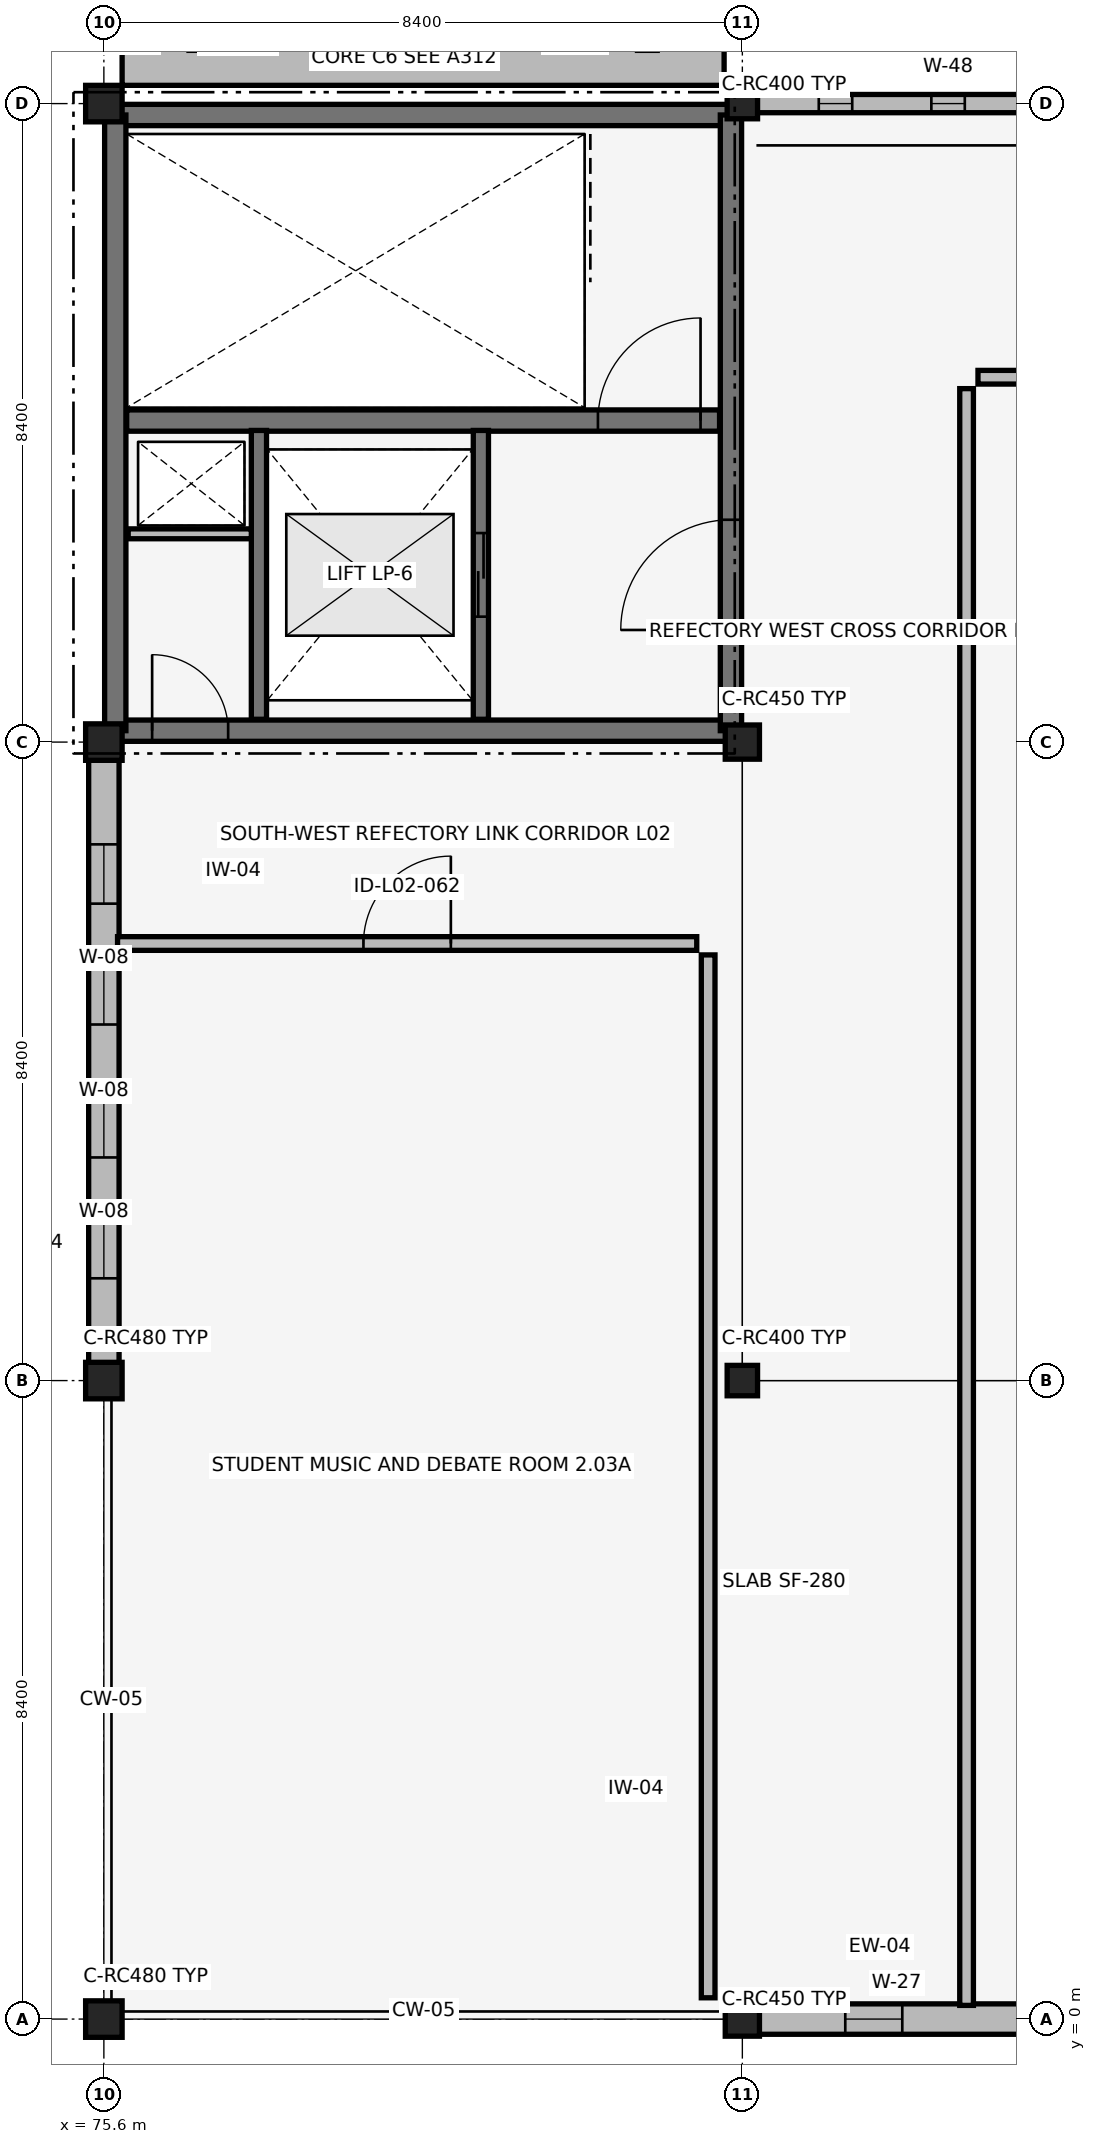
"""IFC4 building model, lengths in metres.
Left out: names, types, materials, properties, quantities, classifications, styles, units other than length and angle.
Written with IfcOpenShell. Run it as: python <this file> out.ifc"""

import sys

from ifc_helpers import new_model, si_unit, direction, frame, frame_2d, origin, origin_2d, place, context, subcontext, project, spatial, rectangle, extrude, element, fill, save


model = new_model("IFC4")
c1 = context("Model", 3, precision=1e-05, world=origin(), true_north=direction((0.0, 1.0)))
c2 = subcontext(c1, "Body", "Model", "MODEL_VIEW")
j1 = project(units=[si_unit("LENGTHUNIT", "METRE"), si_unit("PLANEANGLEUNIT", "RADIAN")], contexts=[c1])
p1 = place(None, origin())
s1 = spatial("IfcSite", under=j1, at=p1, CompositionType="ELEMENT")
p2 = place(p1, origin())
s2 = spatial("IfcBuilding", under=s1, at=p2, CompositionType="ELEMENT")
p3 = place(p2, frame((0.0, 0.0, 9.86)))
s3 = spatial("IfcBuildingStorey", under=s2, at=p3, CompositionType="ELEMENT", Elevation=9.86)
p4 = place(p3, frame((75.75, 16.95, 0.0), z_axis=(0.0, 0.0, 1.0), x_axis=(1.0, 0.0, 0.0)))
e1 = element("IfcWall", 1, at=p4, inside=s3, PredefinedType="SHEAR", context=c2, shape_type="SweptSolid", body=[
    extrude(rectangle(XDim=8.1, YDim=0.28, at=frame_2d((4.05, 0.0))), origin(), (0.0, 0.0, 1.0), 3.78),
])
p5 = place(p4, frame((0.485, 0.0, 0.0)))
e2 = element("IfcOpeningElement", 2, at=p5, cuts=e1, PredefinedType="OPENING", context=c2, shape_type="SweptSolid", body=[
    extrude(rectangle(XDim=1.0, YDim=2.15, at=frame_2d((0.5, 1.075))), frame((0.0, 0.15, 0.0), z_axis=(0.0, -1.0, 0.0), x_axis=(1.0, 0.0, 0.0)), (0.0, 0.0, 1.0), 0.3),
])
for number, where, z_axis, x_axis in (
    (3, (75.75, 25.05, 0.0), (0.0, 0.0, 1.0), (1.0, 0.0, 0.0)),
    (4, (75.75, 16.95, 0.0), (0.0, 0.0, 1.0), (0.0, 1.0, 0.0)),
):
    element("IfcWall", number, at=place(p3, frame(where, z_axis=z_axis, x_axis=x_axis)), inside=s3, PredefinedType="SHEAR", context=c2, shape_type="SweptSolid", body=[
        extrude(rectangle(XDim=8.1, YDim=0.28, at=frame_2d((4.05, 0.0))), origin(), (0.0, 0.0, 1.0), 3.78),
    ])
p6 = place(p3, frame((83.85, 16.95, 0.0), z_axis=(0.0, 0.0, 1.0), x_axis=(0.0, 1.0, 0.0)))
e5 = element("IfcWall", 5, at=p6, inside=s3, PredefinedType="SHEAR", context=c2, shape_type="SweptSolid", body=[
    extrude(rectangle(XDim=8.1, YDim=0.28, at=frame_2d((4.05, 0.0))), origin(), (0.0, 0.0, 1.0), 3.78),
])
p7 = place(p6, frame((1.325, 0.0, 0.0)))
e6 = element("IfcOpeningElement", 6, at=p7, cuts=e5, PredefinedType="OPENING", context=c2, shape_type="SweptSolid", body=[
    extrude(rectangle(XDim=1.45, YDim=2.15, at=frame_2d((0.725, 1.075))), frame((0.0, 0.15, 0.0), z_axis=(0.0, -1.0, 0.0), x_axis=(1.0, 0.0, 0.0)), (0.0, 0.0, 1.0), 0.3),
])
p8 = place(p3, frame((75.9, 21.03, 0.0), z_axis=(0.0, 0.0, 1.0), x_axis=(1.0, 0.0, 0.0)))
e7 = element("IfcWall", 7, at=p8, inside=s3, PredefinedType="SHEAR", context=c2, shape_type="SweptSolid", body=[
    extrude(rectangle(XDim=7.8, YDim=0.28, at=frame_2d((3.9, 0.0))), origin(), (0.0, 0.0, 1.0), 3.78),
])
p9 = place(p8, frame((6.2, 0.0, 0.0)))
e8 = element("IfcOpeningElement", 8, at=p9, cuts=e7, PredefinedType="OPENING", context=c2, shape_type="SweptSolid", body=[
    extrude(rectangle(XDim=1.35, YDim=2.15, at=frame_2d((0.675, 1.075))), frame((0.0, 0.15, 0.0), z_axis=(0.0, -1.0, 0.0), x_axis=(1.0, 0.0, 0.0)), (0.0, 0.0, 1.0), 0.3),
])
for number, where, z_axis, x_axis in (
    (9, (75.6, 0.0, 0.0), (0.0, 0.0, 1.0), (1.0, 0.0, 0.0)),
    (10, (75.6, 8.4, 0.0), (0.0, 0.0, 1.0), (1.0, 0.0, 0.0)),
    (11, (75.6, 16.8, 0.0), (0.0, 0.0, 1.0), (1.0, 0.0, 0.0)),
    (12, (75.6, 25.2, 0.0), (0.0, 0.0, 1.0), (1.0, 0.0, 0.0)),
):
    element("IfcColumn", number, at=place(p3, frame(where, z_axis=z_axis, x_axis=x_axis)), inside=s3, PredefinedType="COLUMN", context=c2, shape_type="SweptSolid", body=[
        extrude(rectangle(XDim=0.48, YDim=0.48, at=origin_2d()), origin(), (0.0, 0.0, 1.0), 3.78),
    ])
p10 = place(p3, frame((84.0, 0.0, 0.0), z_axis=(0.0, 0.0, 1.0), x_axis=(1.0, 0.0, 0.0)))
e13 = element("IfcColumn", 13, at=p10, inside=s3, PredefinedType="COLUMN", context=c2, shape_type="SweptSolid", body=[
    extrude(rectangle(XDim=0.45, YDim=0.45, at=origin_2d()), origin(), (0.0, 0.0, 1.0), 3.78),
])
p11 = place(p3, frame((84.0, 8.4, 0.0), z_axis=(0.0, 0.0, 1.0), x_axis=(1.0, 0.0, 0.0)))
e14 = element("IfcColumn", 14, at=p11, inside=s3, PredefinedType="COLUMN", context=c2, shape_type="SweptSolid", body=[
    extrude(rectangle(XDim=0.4, YDim=0.4, at=origin_2d()), origin(), (0.0, 0.0, 1.0), 3.78),
])
p12 = place(p3, frame((84.0, 16.8, 0.0), z_axis=(0.0, 0.0, 1.0), x_axis=(1.0, 0.0, 0.0)))
e15 = element("IfcColumn", 15, at=p12, inside=s3, PredefinedType="COLUMN", context=c2, shape_type="SweptSolid", body=[
    extrude(rectangle(XDim=0.45, YDim=0.45, at=origin_2d()), origin(), (0.0, 0.0, 1.0), 3.78),
])
p13 = place(p3, frame((84.0, 25.2, 0.0), z_axis=(0.0, 0.0, 1.0), x_axis=(1.0, 0.0, 0.0)))
e16 = element("IfcColumn", 16, at=p13, inside=s3, PredefinedType="COLUMN", context=c2, shape_type="SweptSolid", body=[
    extrude(rectangle(XDim=0.4, YDim=0.4, at=origin_2d()), origin(), (0.0, 0.0, 1.0), 3.78),
])
p14 = place(p3, frame((75.6, 8.625, 0.0), z_axis=(0.0, 0.0, 1.0), x_axis=(0.0, 1.0, 0.0)))
e17 = element("IfcWall", 17, at=p14, inside=s3, PredefinedType="SOLIDWALL", context=c2, shape_type="SweptSolid", body=[
    extrude(rectangle(XDim=7.95, YDim=0.4, at=frame_2d((3.975, 0.0))), origin(), (0.0, 0.0, 1.0), 3.21),
])
p15 = place(p14, frame((1.121, 0.0, 0.75)))
e18 = element("IfcOpeningElement", 18, at=p15, cuts=e17, PredefinedType="OPENING", context=c2, shape_type="SweptSolid", body=[
    extrude(rectangle(XDim=0.78, YDim=2.35, at=frame_2d((0.39, 1.175))), frame((0.0, 0.21, 0.0), z_axis=(0.0, -1.0, 0.0), x_axis=(1.0, 0.0, 0.0)), (0.0, 0.0, 1.0), 0.42),
])
p16 = place(p14, frame((2.71, 0.0, 0.75)))
e19 = element("IfcOpeningElement", 19, at=p16, cuts=e17, PredefinedType="OPENING", context=c2, shape_type="SweptSolid", body=[
    extrude(rectangle(XDim=0.78, YDim=2.35, at=frame_2d((0.39, 1.175))), frame((0.0, 0.21, 0.0), z_axis=(0.0, -1.0, 0.0), x_axis=(1.0, 0.0, 0.0)), (0.0, 0.0, 1.0), 0.42),
])
p17 = place(p14, frame((4.459, 0.0, 0.75)))
e20 = element("IfcOpeningElement", 20, at=p17, cuts=e17, PredefinedType="OPENING", context=c2, shape_type="SweptSolid", body=[
    extrude(rectangle(XDim=0.78, YDim=2.35, at=frame_2d((0.39, 1.175))), frame((0.0, 0.21, 0.0), z_axis=(0.0, -1.0, 0.0), x_axis=(1.0, 0.0, 0.0)), (0.0, 0.0, 1.0), 0.42),
])
p18 = place(p14, frame((6.05, 0.0, 0.75)))
e21 = element("IfcOpeningElement", 21, at=p18, cuts=e17, PredefinedType="OPENING", context=c2, shape_type="SweptSolid", body=[
    extrude(rectangle(XDim=0.78, YDim=2.35, at=frame_2d((0.39, 1.175))), frame((0.0, 0.21, 0.0), z_axis=(0.0, -1.0, 0.0), x_axis=(1.0, 0.0, 0.0)), (0.0, 0.0, 1.0), 0.42),
])
p19 = place(p3, frame((75.84, 25.68, 0.0), z_axis=(0.0, 0.0, 1.0), x_axis=(1.0, 0.0, 0.0)))
e22 = element("IfcWall", 22, at=p19, inside=s3, PredefinedType="SOLIDWALL", context=c2, shape_type="SweptSolid", body=[
    extrude(rectangle(XDim=7.92, YDim=0.48, at=frame_2d((3.96, 0.0))), origin(), (0.0, 0.0, 1.0), 4.08),
])
p20 = place(p3, frame((84.21, 0.0, 0.0), z_axis=(0.0, 0.0, 1.0), x_axis=(1.0, 0.0, 0.0)))
e23 = element("IfcWall", 23, at=p20, inside=s3, PredefinedType="SOLIDWALL", context=c2, shape_type="SweptSolid", body=[
    extrude(rectangle(XDim=7.995, YDim=0.4, at=frame_2d((3.998, 0.0))), origin(), (0.0, 0.0, 1.0), 3.02),
])
p21 = place(p20, frame((1.144, 0.0, 0.7)))
e24 = element("IfcOpeningElement", 24, at=p21, cuts=e23, PredefinedType="OPENING", context=c2, shape_type="SweptSolid", body=[
    extrude(rectangle(XDim=0.75, YDim=2.1, at=frame_2d((0.375, 1.05))), frame((0.0, 0.21, 0.0), z_axis=(0.0, -1.0, 0.0), x_axis=(1.0, 0.0, 0.0)), (0.0, 0.0, 1.0), 0.42),
])
p22 = place(p20, frame((4.502, 0.0, 0.7)))
e25 = element("IfcOpeningElement", 25, at=p22, cuts=e23, PredefinedType="OPENING", context=c2, shape_type="SweptSolid", body=[
    extrude(rectangle(XDim=0.75, YDim=2.1, at=frame_2d((0.375, 1.05))), frame((0.0, 0.21, 0.0), z_axis=(0.0, -1.0, 0.0), x_axis=(1.0, 0.0, 0.0)), (0.0, 0.0, 1.0), 0.42),
])
p23 = place(p20, frame((6.101, 0.0, 0.7)))
e26 = element("IfcOpeningElement", 26, at=p23, cuts=e23, PredefinedType="OPENING", context=c2, shape_type="SweptSolid", body=[
    extrude(rectangle(XDim=0.75, YDim=2.1, at=frame_2d((0.375, 1.05))), frame((0.0, 0.21, 0.0), z_axis=(0.0, -1.0, 0.0), x_axis=(1.0, 0.0, 0.0)), (0.0, 0.0, 1.0), 0.42),
])
p24 = place(p3, frame((84.185, 25.2, 0.0), z_axis=(0.0, 0.0, 1.0), x_axis=(1.0, 0.0, 0.0)))
e27 = element("IfcWall", 27, at=p24, inside=s3, PredefinedType="SOLIDWALL", context=c2, shape_type="SweptSolid", body=[
    extrude(rectangle(XDim=8.005, YDim=0.24, at=frame_2d((4.002, 0.0))), origin(), (0.0, 0.0, 1.0), 3.01),
])
p25 = place(p24, frame((0.821, 0.0, 0.35)))
e28 = element("IfcOpeningElement", 28, at=p25, cuts=e27, PredefinedType="OPENING", context=c2, shape_type="SweptSolid", body=[
    extrude(rectangle(XDim=0.44, YDim=1.25, at=frame_2d((0.22, 0.625))), frame((0.0, 0.13, 0.0), z_axis=(0.0, -1.0, 0.0), x_axis=(1.0, 0.0, 0.0)), (0.0, 0.0, 1.0), 0.26),
])
p26 = place(p24, frame((2.302, 0.0, 0.35)))
e29 = element("IfcOpeningElement", 29, at=p26, cuts=e27, PredefinedType="OPENING", context=c2, shape_type="SweptSolid", body=[
    extrude(rectangle(XDim=0.44, YDim=1.25, at=frame_2d((0.22, 0.625))), frame((0.0, 0.13, 0.0), z_axis=(0.0, -1.0, 0.0), x_axis=(1.0, 0.0, 0.0)), (0.0, 0.0, 1.0), 0.26),
])
p27 = place(p24, frame((3.782, 0.0, 0.35)))
e30 = element("IfcOpeningElement", 30, at=p27, cuts=e27, PredefinedType="OPENING", context=c2, shape_type="SweptSolid", body=[
    extrude(rectangle(XDim=0.44, YDim=1.25, at=frame_2d((0.22, 0.625))), frame((0.0, 0.13, 0.0), z_axis=(0.0, -1.0, 0.0), x_axis=(1.0, 0.0, 0.0)), (0.0, 0.0, 1.0), 0.26),
])
p28 = place(p24, frame((5.263, 0.0, 0.35)))
e31 = element("IfcOpeningElement", 31, at=p28, cuts=e27, PredefinedType="OPENING", context=c2, shape_type="SweptSolid", body=[
    extrude(rectangle(XDim=0.44, YDim=1.25, at=frame_2d((0.22, 0.625))), frame((0.0, 0.13, 0.0), z_axis=(0.0, -1.0, 0.0), x_axis=(1.0, 0.0, 0.0)), (0.0, 0.0, 1.0), 0.26),
])
p29 = place(p24, frame((6.744, 0.0, 0.35)))
e32 = element("IfcOpeningElement", 32, at=p29, cuts=e27, PredefinedType="OPENING", context=c2, shape_type="SweptSolid", body=[
    extrude(rectangle(XDim=0.44, YDim=1.25, at=frame_2d((0.22, 0.625))), frame((0.0, 0.13, 0.0), z_axis=(0.0, -1.0, 0.0), x_axis=(1.0, 0.0, 0.0)), (0.0, 0.0, 1.0), 0.26),
])
p30 = place(p3, frame((80.56, 17.1, 0.0), z_axis=(0.0, 0.0, 1.0), x_axis=(0.0, 1.0, 0.0)))
e33 = element("IfcWall", 33, at=p30, inside=s3, PredefinedType="SHEAR", context=c2, shape_type="SweptSolid", body=[
    extrude(rectangle(XDim=3.8, YDim=0.2, at=frame_2d((1.9, 0.0))), origin(), (0.0, 0.0, 1.0), 2.92),
])
p31 = place(p30, frame((1.35, 0.0, 0.0)))
e34 = element("IfcOpeningElement", 34, at=p31, cuts=e33, PredefinedType="OPENING", context=c2, shape_type="SweptSolid", body=[
    extrude(rectangle(XDim=1.1, YDim=2.15, at=frame_2d((0.55, 1.075))), frame((0.0, 0.11, 0.0), z_axis=(0.0, -1.0, 0.0), x_axis=(1.0, 0.0, 0.0)), (0.0, 0.0, 1.0), 0.22),
])
p32 = place(p3, frame((77.64, 17.1, 0.0), z_axis=(0.0, 0.0, 1.0), x_axis=(0.0, 1.0, 0.0)))
e35 = element("IfcWall", 35, at=p32, inside=s3, PredefinedType="SHEAR", context=c2, shape_type="SweptSolid", body=[
    extrude(rectangle(XDim=3.8, YDim=0.2, at=frame_2d((1.9, 0.0))), origin(), (0.0, 0.0, 1.0), 2.92),
])
p33 = place(p3, frame((75.92, 19.54, 0.0), z_axis=(0.0, 0.0, 1.0), x_axis=(1.0, 0.0, 0.0)))
e36 = element("IfcWall", 36, at=p33, inside=s3, PredefinedType="PARTITIONING", context=c2, shape_type="SweptSolid", body=[
    extrude(rectangle(XDim=1.62, YDim=0.13, at=frame_2d((0.81, 0.0))), origin(), (0.0, 0.0, 1.0), 3.78),
])
p34 = place(p3, frame((75.78, 14.15, 0.0), z_axis=(0.0, 0.0, 1.0), x_axis=(1.0, 0.0, 0.0)))
e37 = element("IfcWall", 37, at=p34, inside=s3, PredefinedType="PARTITIONING", context=c2, shape_type="SweptSolid", body=[
    extrude(rectangle(XDim=7.62, YDim=0.18, at=frame_2d((3.81, 0.0))), origin(), (0.0, 0.0, 1.0), 3.45),
])
p35 = place(p34, frame((3.235, 0.0, 0.0)))
e38 = element("IfcOpeningElement", 38, at=p35, cuts=e37, PredefinedType="OPENING", context=c2, shape_type="SweptSolid", body=[
    extrude(rectangle(XDim=1.15, YDim=2.15, at=frame_2d((0.575, 1.075))), frame((0.0, 0.1, 0.0), z_axis=(0.0, -1.0, 0.0), x_axis=(1.0, 0.0, 0.0)), (0.0, 0.0, 1.0), 0.2),
])
p36 = place(p3, frame((83.55, 0.28, 0.0), z_axis=(0.0, 0.0, 1.0), x_axis=(0.0, 1.0, 0.0)))
e39 = element("IfcWall", 39, at=p36, inside=s3, PredefinedType="PARTITIONING", context=c2, shape_type="SweptSolid", body=[
    extrude(rectangle(XDim=13.72, YDim=0.18, at=frame_2d((6.86, 0.0))), origin(), (0.0, 0.0, 1.0), 2.96),
])
p37 = place(p3, frame((87.1, 21.6, 0.0), z_axis=(0.0, 0.0, 1.0), x_axis=(1.0, 0.0, 0.0)))
e40 = element("IfcWall", 40, at=p37, inside=s3, PredefinedType="PARTITIONING", context=c2, shape_type="SweptSolid", body=[
    extrude(rectangle(XDim=17.45, YDim=0.18, at=frame_2d((8.725, 0.0))), origin(), (0.0, 0.0, 1.0), 2.96),
])
p38 = place(p37, frame((8.15, 0.0, 0.0)))
e41 = element("IfcOpeningElement", 41, at=p38, cuts=e40, PredefinedType="OPENING", context=c2, shape_type="SweptSolid", body=[
    extrude(rectangle(XDim=1.15, YDim=2.15, at=frame_2d((0.575, 1.075))), frame((0.0, 0.1, 0.0), z_axis=(0.0, -1.0, 0.0), x_axis=(1.0, 0.0, 0.0)), (0.0, 0.0, 1.0), 0.2),
])
p39 = place(p3, frame((86.95, 0.18, 0.0), z_axis=(0.0, 0.0, 1.0), x_axis=(0.0, 1.0, 0.0)))
e42 = element("IfcWall", 42, at=p39, inside=s3, PredefinedType="PARTITIONING", context=c2, shape_type="SweptSolid", body=[
    extrude(rectangle(XDim=21.27, YDim=0.18, at=frame_2d((10.635, 0.0))), origin(), (0.0, 0.0, 1.0), 2.92),
])
p40 = place(p15, origin())
e43 = element("IfcWindow", 43, at=p40, inside=s3, PartitioningType="DOUBLE_PANEL_VERTICAL", PredefinedType="WINDOW", context=c2, shape_type="SweptSolid", body=[
    extrude(rectangle(XDim=0.78, YDim=2.35, at=frame_2d((0.39, 1.175))), frame((0.0, 0.03, 0.0), z_axis=(0.0, -1.0, 0.0), x_axis=(1.0, 0.0, 0.0)), (0.0, 0.0, 1.0), 0.06),
])
fill(e18, e43)
p41 = place(p16, origin())
e44 = element("IfcWindow", 44, at=p41, inside=s3, PartitioningType="DOUBLE_PANEL_VERTICAL", PredefinedType="WINDOW", context=c2, shape_type="SweptSolid", body=[
    extrude(rectangle(XDim=0.78, YDim=2.35, at=frame_2d((0.39, 1.175))), frame((0.0, 0.03, 0.0), z_axis=(0.0, -1.0, 0.0), x_axis=(1.0, 0.0, 0.0)), (0.0, 0.0, 1.0), 0.06),
])
fill(e19, e44)
p42 = place(p17, origin())
e45 = element("IfcWindow", 45, at=p42, inside=s3, PartitioningType="DOUBLE_PANEL_VERTICAL", PredefinedType="WINDOW", context=c2, shape_type="SweptSolid", body=[
    extrude(rectangle(XDim=0.78, YDim=2.35, at=frame_2d((0.39, 1.175))), frame((0.0, 0.03, 0.0), z_axis=(0.0, -1.0, 0.0), x_axis=(1.0, 0.0, 0.0)), (0.0, 0.0, 1.0), 0.06),
])
fill(e20, e45)
p43 = place(p18, origin())
e46 = element("IfcWindow", 46, at=p43, inside=s3, PartitioningType="DOUBLE_PANEL_VERTICAL", PredefinedType="WINDOW", context=c2, shape_type="SweptSolid", body=[
    extrude(rectangle(XDim=0.78, YDim=2.35, at=frame_2d((0.39, 1.175))), frame((0.0, 0.03, 0.0), z_axis=(0.0, -1.0, 0.0), x_axis=(1.0, 0.0, 0.0)), (0.0, 0.0, 1.0), 0.06),
])
fill(e21, e46)
p44 = place(p21, origin())
e47 = element("IfcWindow", 47, at=p44, inside=s3, PartitioningType="DOUBLE_PANEL_VERTICAL", PredefinedType="WINDOW", context=c2, shape_type="SweptSolid", body=[
    extrude(rectangle(XDim=0.75, YDim=2.1, at=frame_2d((0.375, 1.05))), frame((0.0, 0.03, 0.0), z_axis=(0.0, -1.0, 0.0), x_axis=(1.0, 0.0, 0.0)), (0.0, 0.0, 1.0), 0.06),
])
fill(e24, e47)
p45 = place(p25, origin())
e48 = element("IfcWindow", 48, at=p45, inside=s3, PartitioningType="SINGLE_PANEL", PredefinedType="WINDOW", context=c2, shape_type="SweptSolid", body=[
    extrude(rectangle(XDim=0.44, YDim=1.25, at=frame_2d((0.22, 0.625))), frame((0.0, 0.03, 0.0), z_axis=(0.0, -1.0, 0.0), x_axis=(1.0, 0.0, 0.0)), (0.0, 0.0, 1.0), 0.06),
])
fill(e28, e48)
p46 = place(p26, origin())
e49 = element("IfcWindow", 49, at=p46, inside=s3, PartitioningType="SINGLE_PANEL", PredefinedType="WINDOW", context=c2, shape_type="SweptSolid", body=[
    extrude(rectangle(XDim=0.44, YDim=1.25, at=frame_2d((0.22, 0.625))), frame((0.0, 0.03, 0.0), z_axis=(0.0, -1.0, 0.0), x_axis=(1.0, 0.0, 0.0)), (0.0, 0.0, 1.0), 0.06),
])
fill(e29, e49)
p47 = place(p9, origin())
e50 = element("IfcDoor", 50, at=p47, inside=s3, OperationType="SINGLE_SWING_RIGHT", PredefinedType="DOOR", context=c2, shape_type="SweptSolid", body=[
    extrude(rectangle(XDim=1.35, YDim=2.15, at=frame_2d((0.675, 1.075))), frame((0.0, 0.025, 0.0), z_axis=(0.0, -1.0, 0.0), x_axis=(1.0, 0.0, 0.0)), (0.0, 0.0, 1.0), 0.05),
])
fill(e8, e50)
p48 = place(p31, origin())
e51 = element("IfcDoor", 51, at=p48, inside=s3, OperationType="SLIDING_TO_LEFT", PredefinedType="DOOR", context=c2, shape_type="SweptSolid", body=[
    extrude(rectangle(XDim=1.1, YDim=2.15, at=frame_2d((0.55, 1.075))), frame((0.0, 0.025, 0.0), z_axis=(0.0, -1.0, 0.0), x_axis=(1.0, 0.0, 0.0)), (0.0, 0.0, 1.0), 0.05),
])
fill(e34, e51)
p49 = place(p7, origin())
e52 = element("IfcDoor", 52, at=p49, inside=s3, OperationType="DOUBLE_DOOR_SINGLE_SWING", PredefinedType="DOOR", context=c2, shape_type="SweptSolid", body=[
    extrude(rectangle(XDim=1.45, YDim=2.15, at=frame_2d((0.725, 1.075))), frame((0.0, 0.025, 0.0), z_axis=(0.0, -1.0, 0.0), x_axis=(1.0, 0.0, 0.0)), (0.0, 0.0, 1.0), 0.05),
])
fill(e6, e52)
p50 = place(p5, origin())
e53 = element("IfcDoor", 53, at=p50, inside=s3, OperationType="SINGLE_SWING_LEFT", PredefinedType="DOOR", context=c2, shape_type="SweptSolid", body=[
    extrude(rectangle(XDim=1.0, YDim=2.15, at=frame_2d((0.5, 1.075))), frame((0.0, 0.025, 0.0), z_axis=(0.0, -1.0, 0.0), x_axis=(1.0, 0.0, 0.0)), (0.0, 0.0, 1.0), 0.05),
])
fill(e2, e53)
p51 = place(p35, origin())
e54 = element("IfcDoor", 54, at=p51, inside=s3, OperationType="SINGLE_SWING_RIGHT", PredefinedType="DOOR", context=c2, shape_type="SweptSolid", body=[
    extrude(rectangle(XDim=1.15, YDim=2.15, at=frame_2d((0.575, 1.075))), frame((0.0, 0.025, 0.0), z_axis=(0.0, -1.0, 0.0), x_axis=(1.0, 0.0, 0.0)), (0.0, 0.0, 1.0), 0.05),
])
fill(e38, e54)
save(model, sys.argv[1])
